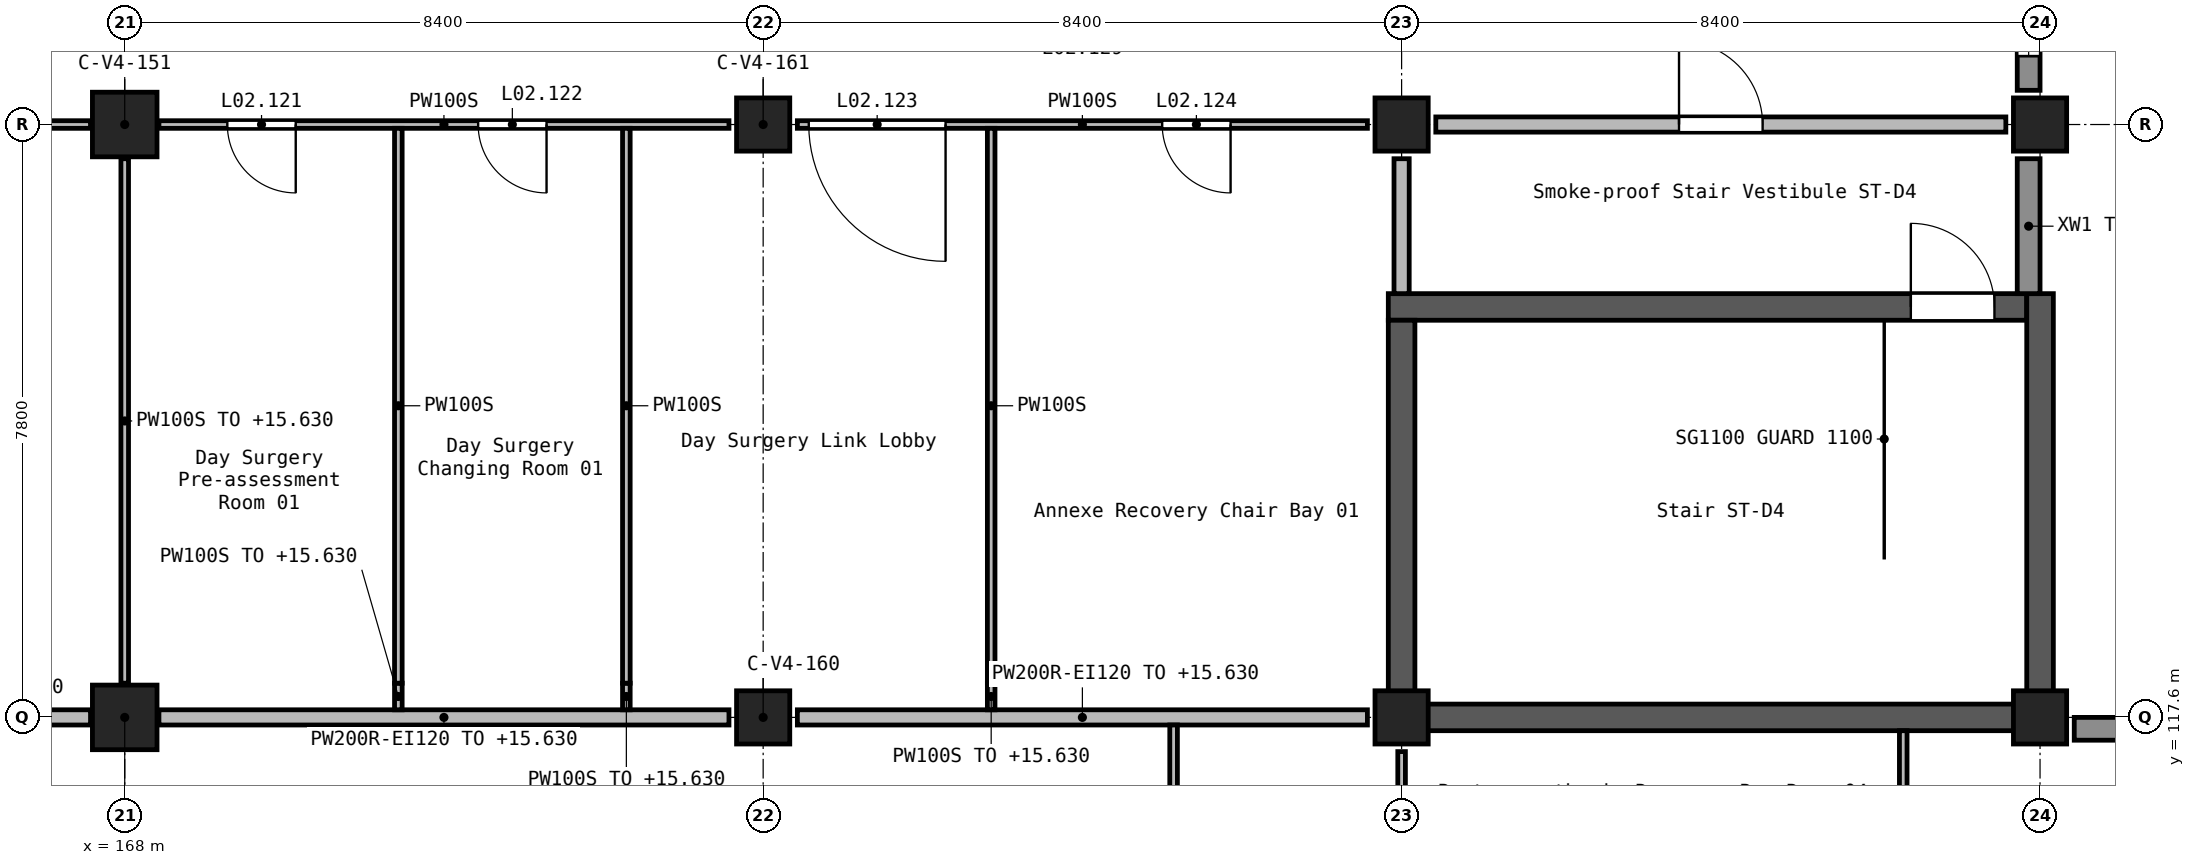
"""IFC4 building model, lengths in metres.
Left out: names, types, materials, properties, quantities, classifications, styles, units other than length and angle.
Written with IfcOpenShell. Run it as: python <this file> out.ifc"""

import sys

from ifc_helpers import new_model, si_unit, direction, frame, frame_2d, origin, origin_2d, place, context, subcontext, project, spatial, rectangle, extrude, element, fill, save


model = new_model("IFC4")
c1 = context("Model", 3, precision=1e-05, world=origin(), true_north=direction((0.0, 1.0)))
c2 = subcontext(c1, "Body", "Model", "MODEL_VIEW")
j1 = project(units=[si_unit("LENGTHUNIT", "METRE"), si_unit("PLANEANGLEUNIT", "RADIAN")], contexts=[c1])
p1 = place(None, origin())
s1 = spatial("IfcSite", under=j1, at=p1, CompositionType="ELEMENT")
p2 = place(p1, origin())
s2 = spatial("IfcBuilding", under=s1, at=p2, CompositionType="ELEMENT")
p3 = place(p2, frame((0.0, 0.0, 12.6)))
s3 = spatial("IfcBuildingStorey", under=s2, at=p3, CompositionType="ELEMENT", Elevation=12.6)
for number, where, z_axis, x_axis in (
    (1, (168.0, 117.6, 0.0), (0.0, 0.0, 1.0), (1.0, 0.0, 0.0)),
    (2, (168.0, 125.4, 0.0), (0.0, 0.0, 1.0), (1.0, 0.0, 0.0)),
):
    element("IfcColumn", number, at=place(p3, frame(where, z_axis=z_axis, x_axis=x_axis)), inside=s3, PredefinedType="COLUMN", context=c2, shape_type="SweptSolid", body=[
        extrude(rectangle(XDim=0.85, YDim=0.85, at=origin_2d()), origin(), (0.0, 0.0, 1.0), 4.2),
    ])
for number, where, z_axis, x_axis in (
    (3, (176.4, 117.6, 0.0), (0.0, 0.0, 1.0), (1.0, 0.0, 0.0)),
    (4, (176.4, 125.4, 0.0), (0.0, 0.0, 1.0), (1.0, 0.0, 0.0)),
    (5, (184.8, 117.6, 0.0), (0.0, 0.0, 1.0), (1.0, 0.0, 0.0)),
    (6, (184.8, 125.4, 0.0), (0.0, 0.0, 1.0), (1.0, 0.0, 0.0)),
    (7, (193.2, 117.6, 0.0), (0.0, 0.0, 1.0), (1.0, 0.0, 0.0)),
    (8, (193.2, 125.4, 0.0), (0.0, 0.0, 1.0), (1.0, 0.0, 0.0)),
):
    element("IfcColumn", number, at=place(p3, frame(where, z_axis=z_axis, x_axis=x_axis)), inside=s3, PredefinedType="COLUMN", context=c2, shape_type="SweptSolid", body=[
        extrude(rectangle(XDim=0.7, YDim=0.7, at=origin_2d()), origin(), (0.0, 0.0, 1.0), 4.2),
    ])
p4 = place(p3, frame((184.625, 123.0, 0.0), z_axis=(0.0, 0.0, 1.0), x_axis=(1.0, 0.0, 0.0)))
e9 = element("IfcWall", 9, at=p4, inside=s3, PredefinedType="SHEAR", context=c2, shape_type="SweptSolid", body=[
    extrude(rectangle(XDim=8.4, YDim=0.35, at=frame_2d((4.2, 0.0))), origin(), (0.0, 0.0, 1.0), 4.2),
])
p5 = place(p4, frame((6.875, 0.0, 0.0)))
e10 = element("IfcOpeningElement", 10, at=p5, cuts=e9, PredefinedType="OPENING", context=c2, shape_type="SweptSolid", body=[
    extrude(rectangle(XDim=1.1, YDim=2.1, at=frame_2d((0.55, 1.05))), frame((0.0, 0.185, 0.0), z_axis=(0.0, -1.0, 0.0), x_axis=(1.0, 0.0, 0.0)), (0.0, 0.0, 1.0), 0.37),
])
p6 = place(p3, frame((184.8, 117.425, 0.0), z_axis=(0.0, 0.0, 1.0), x_axis=(0.0, 1.0, 0.0)))
e11 = element("IfcWall", 11, at=p6, inside=s3, PredefinedType="SHEAR", context=c2, shape_type="SweptSolid", body=[
    extrude(rectangle(XDim=5.4, YDim=0.35, at=frame_2d((2.7, 0.0))), origin(), (0.0, 0.0, 1.0), 4.2),
])
p7 = place(p3, frame((184.975, 117.6, 0.0), z_axis=(0.0, 0.0, 1.0), x_axis=(1.0, 0.0, 0.0)))
e12 = element("IfcWall", 12, at=p7, inside=s3, PredefinedType="SHEAR", context=c2, shape_type="SweptSolid", body=[
    extrude(rectangle(XDim=8.05, YDim=0.35, at=frame_2d((4.025, 0.0))), origin(), (0.0, 0.0, 1.0), 4.2),
])
p8 = place(p3, frame((193.2, 117.425, 0.0), z_axis=(0.0, 0.0, 1.0), x_axis=(0.0, 1.0, 0.0)))
e13 = element("IfcWall", 13, at=p8, inside=s3, PredefinedType="SHEAR", context=c2, shape_type="SweptSolid", body=[
    extrude(rectangle(XDim=5.75, YDim=0.35, at=frame_2d((2.875, 0.0))), origin(), (0.0, 0.0, 1.0), 4.2),
])
p9 = place(p3, frame((197.0, 117.45, 0.0), z_axis=(0.0, 0.0, 1.0), x_axis=(-1.0, 0.0, 0.0)))
e14 = element("IfcWall", 14, at=p9, inside=s3, PredefinedType="STANDARD", context=c2, shape_type="SweptSolid", body=[
    extrude(rectangle(XDim=3.35, YDim=0.3, at=frame_2d((1.675, 0.0))), origin(), (0.0, 0.0, 1.0), 3.05),
])
p10 = place(p9, frame((1.075, 0.0, 1.2)))
e15 = element("IfcOpeningElement", 15, at=p10, cuts=e14, PredefinedType="OPENING", context=c2, shape_type="SweptSolid", body=[
    extrude(rectangle(XDim=1.2, YDim=1.2, at=frame_2d((0.6, 0.6))), frame((0.0, 0.16, 0.0), z_axis=(0.0, -1.0, 0.0), x_axis=(1.0, 0.0, 0.0)), (0.0, 0.0, 1.0), 0.32),
])
p11 = place(p3, frame((193.05, 123.175, 0.0), z_axis=(0.0, 0.0, 1.0), x_axis=(0.0, 1.0, 0.0)))
e16 = element("IfcWall", 16, at=p11, inside=s3, PredefinedType="STANDARD", context=c2, shape_type="SweptSolid", body=[
    extrude(rectangle(XDim=1.775, YDim=0.3, at=frame_2d((0.887, 0.0))), origin(), (0.0, 0.0, 1.0), 3.05),
])
p12 = place(p3, frame((193.05, 125.85, 0.0), z_axis=(0.0, 0.0, 1.0), x_axis=(0.0, 1.0, 0.0)))
e17 = element("IfcWall", 17, at=p12, inside=s3, PredefinedType="STANDARD", context=c2, shape_type="SweptSolid", body=[
    extrude(rectangle(XDim=2.7, YDim=0.3, at=frame_2d((1.35, 0.0))), origin(), (0.0, 0.0, 1.0), 3.05),
])
p13 = place(p12, frame((0.45, 0.0, 0.9)))
e18 = element("IfcOpeningElement", 18, at=p13, cuts=e17, PredefinedType="OPENING", context=c2, shape_type="SweptSolid", body=[
    extrude(rectangle(XDim=1.8, YDim=1.5, at=frame_2d((0.9, 0.75))), frame((0.0, 0.16, 0.0), z_axis=(0.0, -1.0, 0.0), x_axis=(1.0, 0.0, 0.0)), (0.0, 0.0, 1.0), 0.32),
])
for number, where, z_axis, x_axis in (
    (19, (184.35, 117.6, 0.0), (0.0, 0.0, 1.0), (-1.0, 0.0, 0.0)),
    (20, (175.95, 117.6, 0.0), (0.0, 0.0, 1.0), (-1.0, 0.0, 0.0)),
):
    element("IfcWall", number, at=place(p3, frame(where, z_axis=z_axis, x_axis=x_axis)), inside=s3, PredefinedType="SOLIDWALL", context=c2, shape_type="SweptSolid", body=[
        extrude(rectangle(XDim=7.5, YDim=0.2, at=frame_2d((3.75, 0.0))), origin(), (0.0, 0.0, 1.0), 3.03),
    ])
p14 = place(p3, frame((167.55, 117.6, 0.0), z_axis=(0.0, 0.0, 1.0), x_axis=(-1.0, 0.0, 0.0)))
e21 = element("IfcWall", 21, at=p14, inside=s3, PredefinedType="SOLIDWALL", context=c2, shape_type="SweptSolid", body=[
    extrude(rectangle(XDim=3.45, YDim=0.2, at=frame_2d((1.725, 0.0))), origin(), (0.0, 0.0, 1.0), 3.08),
])
p15 = place(p3, frame((185.25, 125.4, 0.0), z_axis=(0.0, 0.0, 1.0), x_axis=(1.0, 0.0, 0.0)))
e22 = element("IfcWall", 22, at=p15, inside=s3, PredefinedType="SOLIDWALL", context=c2, shape_type="SweptSolid", body=[
    extrude(rectangle(XDim=7.5, YDim=0.2, at=frame_2d((3.75, 0.0))), origin(), (0.0, 0.0, 1.0), 3.85),
])
p16 = place(p15, frame((3.2, 0.0, 0.0)))
e23 = element("IfcOpeningElement", 23, at=p16, cuts=e22, PredefinedType="OPENING", context=c2, shape_type="SweptSolid", body=[
    extrude(rectangle(XDim=1.1, YDim=2.1, at=frame_2d((0.55, 1.05))), frame((0.0, 0.11, 0.0), z_axis=(0.0, -1.0, 0.0), x_axis=(1.0, 0.0, 0.0)), (0.0, 0.0, 1.0), 0.22),
])
p17 = place(p3, frame((184.8, 123.175, 0.0), z_axis=(0.0, 0.0, 1.0), x_axis=(0.0, 1.0, 0.0)))
e24 = element("IfcWall", 24, at=p17, inside=s3, PredefinedType="SOLIDWALL", context=c2, shape_type="SweptSolid", body=[
    extrude(rectangle(XDim=1.775, YDim=0.2, at=frame_2d((0.887, 0.0))), origin(), (0.0, 0.0, 1.0), 3.85),
])
p18 = place(p3, frame((184.35, 125.4, 0.0), z_axis=(0.0, 0.0, 1.0), x_axis=(-1.0, 0.0, 0.0)))
e25 = element("IfcWall", 25, at=p18, inside=s3, PredefinedType="PARTITIONING", context=c2, shape_type="SweptSolid", body=[
    extrude(rectangle(XDim=7.5, YDim=0.1, at=frame_2d((3.75, 0.0))), origin(), (0.0, 0.0, 1.0), 3.85),
])
p19 = place(p18, frame((5.55, 0.0, 0.0)))
e26 = element("IfcOpeningElement", 26, at=p19, cuts=e25, PredefinedType="OPENING", context=c2, shape_type="SweptSolid", body=[
    extrude(rectangle(XDim=1.8, YDim=2.1, at=frame_2d((0.9, 1.05))), frame((0.0, 0.06, 0.0), z_axis=(0.0, -1.0, 0.0), x_axis=(1.0, 0.0, 0.0)), (0.0, 0.0, 1.0), 0.12),
])
p20 = place(p18, frame((1.8, 0.0, 0.0)))
e27 = element("IfcOpeningElement", 27, at=p20, cuts=e25, PredefinedType="OPENING", context=c2, shape_type="SweptSolid", body=[
    extrude(rectangle(XDim=0.9, YDim=2.1, at=frame_2d((0.45, 1.05))), frame((0.0, 0.06, 0.0), z_axis=(0.0, -1.0, 0.0), x_axis=(1.0, 0.0, 0.0)), (0.0, 0.0, 1.0), 0.12),
])
p21 = place(p3, frame((175.95, 125.4, 0.0), z_axis=(0.0, 0.0, 1.0), x_axis=(-1.0, 0.0, 0.0)))
e28 = element("IfcWall", 28, at=p21, inside=s3, PredefinedType="PARTITIONING", context=c2, shape_type="SweptSolid", body=[
    extrude(rectangle(XDim=7.5, YDim=0.1, at=frame_2d((3.75, 0.0))), origin(), (0.0, 0.0, 1.0), 3.85),
])
p22 = place(p21, frame((5.7, 0.0, 0.0)))
e29 = element("IfcOpeningElement", 29, at=p22, cuts=e28, PredefinedType="OPENING", context=c2, shape_type="SweptSolid", body=[
    extrude(rectangle(XDim=0.9, YDim=2.1, at=frame_2d((0.45, 1.05))), frame((0.0, 0.06, 0.0), z_axis=(0.0, -1.0, 0.0), x_axis=(1.0, 0.0, 0.0)), (0.0, 0.0, 1.0), 0.12),
])
p23 = place(p21, frame((2.4, 0.0, 0.0)))
e30 = element("IfcOpeningElement", 30, at=p23, cuts=e28, PredefinedType="OPENING", context=c2, shape_type="SweptSolid", body=[
    extrude(rectangle(XDim=0.9, YDim=2.1, at=frame_2d((0.45, 1.05))), frame((0.0, 0.06, 0.0), z_axis=(0.0, -1.0, 0.0), x_axis=(1.0, 0.0, 0.0)), (0.0, 0.0, 1.0), 0.12),
])
p24 = place(p3, frame((167.55, 125.4, 0.0), z_axis=(0.0, 0.0, 1.0), x_axis=(-1.0, 0.0, 0.0)))
e31 = element("IfcWall", 31, at=p24, inside=s3, PredefinedType="PARTITIONING", context=c2, shape_type="SweptSolid", body=[
    extrude(rectangle(XDim=7.5, YDim=0.1, at=frame_2d((3.75, 0.0))), origin(), (0.0, 0.0, 1.0), 3.85),
])
p25 = place(p24, frame((2.85, 0.0, 0.0)))
e32 = element("IfcOpeningElement", 32, at=p25, cuts=e31, PredefinedType="OPENING", context=c2, shape_type="SweptSolid", body=[
    extrude(rectangle(XDim=1.8, YDim=2.1, at=frame_2d((0.9, 1.05))), frame((0.0, 0.06, 0.0), z_axis=(0.0, -1.0, 0.0), x_axis=(1.0, 0.0, 0.0)), (0.0, 0.0, 1.0), 0.12),
])
p26 = place(p3, frame((181.8, 117.5, 0.0), z_axis=(0.0, 0.0, 1.0), x_axis=(0.0, -1.0, 0.0)))
e33 = element("IfcWall", 33, at=p26, inside=s3, PredefinedType="PARTITIONING", context=c2, shape_type="SweptSolid", body=[
    extrude(rectangle(XDim=18.55, YDim=0.1, at=frame_2d((9.275, 0.0))), origin(), (0.0, 0.0, 1.0), 3.85),
])
p27 = place(p26, frame((9.05, 0.0, 0.0)))
e34 = element("IfcOpeningElement", 34, at=p27, cuts=e33, PredefinedType="OPENING", context=c2, shape_type="SweptSolid", body=[
    extrude(rectangle(XDim=0.9, YDim=2.1, at=frame_2d((0.45, 1.05))), frame((0.0, 0.06, 0.0), z_axis=(0.0, -1.0, 0.0), x_axis=(1.0, 0.0, 0.0)), (0.0, 0.0, 1.0), 0.12),
])
p28 = place(p26, frame((6.051, 0.0, 0.0)))
e35 = element("IfcOpeningElement", 35, at=p28, cuts=e33, PredefinedType="OPENING", context=c2, shape_type="SweptSolid", body=[
    extrude(rectangle(XDim=0.9, YDim=2.1, at=frame_2d((0.45, 1.05))), frame((0.0, 0.06, 0.0), z_axis=(0.0, -1.0, 0.0), x_axis=(1.0, 0.0, 0.0)), (0.0, 0.0, 1.0), 0.12),
])
p29 = place(p26, frame((1.851, 0.0, 0.0)))
e36 = element("IfcOpeningElement", 36, at=p29, cuts=e33, PredefinedType="OPENING", context=c2, shape_type="SweptSolid", body=[
    extrude(rectangle(XDim=0.9, YDim=2.1, at=frame_2d((0.45, 1.05))), frame((0.0, 0.06, 0.0), z_axis=(0.0, -1.0, 0.0), x_axis=(1.0, 0.0, 0.0)), (0.0, 0.0, 1.0), 0.12),
])
p30 = place(p3, frame((184.8, 117.15, 0.0), z_axis=(0.0, 0.0, 1.0), x_axis=(0.0, -1.0, 0.0)))
e37 = element("IfcWall", 37, at=p30, inside=s3, PredefinedType="PARTITIONING", context=c2, shape_type="SweptSolid", body=[
    extrude(rectangle(XDim=18.2, YDim=0.1, at=frame_2d((9.1, 0.0))), origin(), (0.0, 0.0, 1.0), 3.85),
])
p31 = place(p30, frame((13.55, 0.0, 0.0)))
e38 = element("IfcOpeningElement", 38, at=p31, cuts=e37, PredefinedType="OPENING", context=c2, shape_type="SweptSolid", body=[
    extrude(rectangle(XDim=1.4, YDim=2.1, at=frame_2d((0.7, 1.05))), frame((0.0, 0.06, 0.0), z_axis=(0.0, -1.0, 0.0), x_axis=(1.0, 0.0, 0.0)), (0.0, 0.0, 1.0), 0.12),
])
p32 = place(p30, frame((9.35, 0.0, 0.0)))
e39 = element("IfcOpeningElement", 39, at=p32, cuts=e37, PredefinedType="OPENING", context=c2, shape_type="SweptSolid", body=[
    extrude(rectangle(XDim=1.4, YDim=2.1, at=frame_2d((0.7, 1.05))), frame((0.0, 0.06, 0.0), z_axis=(0.0, -1.0, 0.0), x_axis=(1.0, 0.0, 0.0)), (0.0, 0.0, 1.0), 0.12),
])
p33 = place(p30, frame((5.4, 0.0, 0.0)))
e40 = element("IfcOpeningElement", 40, at=p33, cuts=e37, PredefinedType="OPENING", context=c2, shape_type="SweptSolid", body=[
    extrude(rectangle(XDim=0.9, YDim=2.1, at=frame_2d((0.45, 1.05))), frame((0.0, 0.06, 0.0), z_axis=(0.0, -1.0, 0.0), x_axis=(1.0, 0.0, 0.0)), (0.0, 0.0, 1.0), 0.12),
])
p34 = place(p30, frame((0.95, 0.0, 0.0)))
e41 = element("IfcOpeningElement", 41, at=p34, cuts=e37, PredefinedType="OPENING", context=c2, shape_type="SweptSolid", body=[
    extrude(rectangle(XDim=1.4, YDim=2.1, at=frame_2d((0.7, 1.05))), frame((0.0, 0.06, 0.0), z_axis=(0.0, -1.0, 0.0), x_axis=(1.0, 0.0, 0.0)), (0.0, 0.0, 1.0), 0.12),
])
p35 = place(p3, frame((191.4, 117.425, 0.0), z_axis=(0.0, 0.0, 1.0), x_axis=(0.0, -1.0, 0.0)))
e42 = element("IfcWall", 42, at=p35, inside=s3, PredefinedType="PARTITIONING", context=c2, shape_type="SweptSolid", body=[
    extrude(rectangle(XDim=18.475, YDim=0.1, at=frame_2d((9.238, 0.0))), origin(), (0.0, 0.0, 1.0), 3.85),
])
p36 = place(p3, frame((168.0, 118.05, 0.0), z_axis=(0.0, 0.0, 1.0), x_axis=(0.0, 1.0, 0.0)))
e43 = element("IfcWall", 43, at=p36, inside=s3, PredefinedType="PARTITIONING", context=c2, shape_type="SweptSolid", body=[
    extrude(rectangle(XDim=6.9, YDim=0.1, at=frame_2d((3.45, 0.0))), origin(), (0.0, 0.0, 1.0), 3.03),
])
p37 = place(p3, frame((171.6, 117.7, 0.0), z_axis=(0.0, 0.0, 1.0), x_axis=(0.0, 1.0, 0.0)))
e44 = element("IfcWall", 44, at=p37, inside=s3, PredefinedType="PARTITIONING", context=c2, shape_type="SweptSolid", body=[
    extrude(rectangle(XDim=0.35, YDim=0.1, at=frame_2d((0.175, 0.0))), origin(), (0.0, 0.0, 1.0), 3.03),
])
p38 = place(p3, frame((171.6, 118.05, 0.0), z_axis=(0.0, 0.0, 1.0), x_axis=(0.0, 1.0, 0.0)))
e45 = element("IfcWall", 45, at=p38, inside=s3, PredefinedType="PARTITIONING", context=c2, shape_type="SweptSolid", body=[
    extrude(rectangle(XDim=7.3, YDim=0.1, at=frame_2d((3.65, 0.0))), origin(), (0.0, 0.0, 1.0), 3.85),
])
p39 = place(p3, frame((174.6, 117.7, 0.0), z_axis=(0.0, 0.0, 1.0), x_axis=(0.0, 1.0, 0.0)))
e46 = element("IfcWall", 46, at=p39, inside=s3, PredefinedType="PARTITIONING", context=c2, shape_type="SweptSolid", body=[
    extrude(rectangle(XDim=0.35, YDim=0.1, at=frame_2d((0.175, 0.0))), origin(), (0.0, 0.0, 1.0), 3.03),
])
p40 = place(p3, frame((174.6, 118.05, 0.0), z_axis=(0.0, 0.0, 1.0), x_axis=(0.0, 1.0, 0.0)))
e47 = element("IfcWall", 47, at=p40, inside=s3, PredefinedType="PARTITIONING", context=c2, shape_type="SweptSolid", body=[
    extrude(rectangle(XDim=7.3, YDim=0.1, at=frame_2d((3.65, 0.0))), origin(), (0.0, 0.0, 1.0), 3.85),
])
p41 = place(p3, frame((179.4, 117.7, 0.0), z_axis=(0.0, 0.0, 1.0), x_axis=(0.0, 1.0, 0.0)))
e48 = element("IfcWall", 48, at=p41, inside=s3, PredefinedType="PARTITIONING", context=c2, shape_type="SweptSolid", body=[
    extrude(rectangle(XDim=0.35, YDim=0.1, at=frame_2d((0.175, 0.0))), origin(), (0.0, 0.0, 1.0), 3.03),
])
p42 = place(p3, frame((179.4, 118.05, 0.0), z_axis=(0.0, 0.0, 1.0), x_axis=(0.0, 1.0, 0.0)))
e49 = element("IfcWall", 49, at=p42, inside=s3, PredefinedType="PARTITIONING", context=c2, shape_type="SweptSolid", body=[
    extrude(rectangle(XDim=7.3, YDim=0.1, at=frame_2d((3.65, 0.0))), origin(), (0.0, 0.0, 1.0), 3.85),
])
p43 = place(p13, origin())
e50 = element("IfcWindow", 50, at=p43, inside=s3, PartitioningType="SINGLE_PANEL", PredefinedType="WINDOW", context=c2, shape_type="SweptSolid", body=[
    extrude(rectangle(XDim=1.8, YDim=1.5, at=frame_2d((0.9, 0.75))), frame((0.0, 0.03, 0.0), z_axis=(0.0, -1.0, 0.0), x_axis=(1.0, 0.0, 0.0)), (0.0, 0.0, 1.0), 0.06),
])
fill(e18, e50)
p44 = place(p5, frame((1.1, 0.0, 0.0), z_axis=(0.0, 0.0, 1.0), x_axis=(-1.0, 0.0, 0.0)))
e51 = element("IfcDoor", 51, at=p44, inside=s3, OperationType="SINGLE_SWING_LEFT", PredefinedType="DOOR", context=c2, shape_type="SweptSolid", body=[
    extrude(rectangle(XDim=1.1, YDim=2.1, at=frame_2d((0.55, 1.05))), frame((0.0, 0.025, 0.0), z_axis=(0.0, -1.0, 0.0), x_axis=(1.0, 0.0, 0.0)), (0.0, 0.0, 1.0), 0.05),
])
fill(e10, e51)
p45 = place(p16, frame((1.1, 0.0, 0.0), z_axis=(0.0, 0.0, 1.0), x_axis=(-1.0, 0.0, 0.0)))
e52 = element("IfcDoor", 52, at=p45, inside=s3, OperationType="SINGLE_SWING_LEFT", PredefinedType="DOOR", context=c2, shape_type="SweptSolid", body=[
    extrude(rectangle(XDim=1.1, YDim=2.1, at=frame_2d((0.55, 1.05))), frame((0.0, 0.025, 0.0), z_axis=(0.0, -1.0, 0.0), x_axis=(1.0, 0.0, 0.0)), (0.0, 0.0, 1.0), 0.05),
])
fill(e23, e52)
p46 = place(p22, origin())
e53 = element("IfcDoor", 53, at=p46, inside=s3, OperationType="SINGLE_SWING_RIGHT", PredefinedType="DOOR", context=c2, shape_type="SweptSolid", body=[
    extrude(rectangle(XDim=0.9, YDim=2.1, at=frame_2d((0.45, 1.05))), frame((0.0, 0.025, 0.0), z_axis=(0.0, -1.0, 0.0), x_axis=(1.0, 0.0, 0.0)), (0.0, 0.0, 1.0), 0.05),
])
fill(e29, e53)
p47 = place(p23, origin())
e54 = element("IfcDoor", 54, at=p47, inside=s3, OperationType="SINGLE_SWING_LEFT", PredefinedType="DOOR", context=c2, shape_type="SweptSolid", body=[
    extrude(rectangle(XDim=0.9, YDim=2.1, at=frame_2d((0.45, 1.05))), frame((0.0, 0.025, 0.0), z_axis=(0.0, -1.0, 0.0), x_axis=(1.0, 0.0, 0.0)), (0.0, 0.0, 1.0), 0.05),
])
fill(e30, e54)
p48 = place(p19, origin())
e55 = element("IfcDoor", 55, at=p48, inside=s3, OperationType="DOUBLE_DOOR_SINGLE_SWING", PredefinedType="DOOR", context=c2, shape_type="SweptSolid", body=[
    extrude(rectangle(XDim=1.8, YDim=2.1, at=frame_2d((0.9, 1.05))), frame((0.0, 0.025, 0.0), z_axis=(0.0, -1.0, 0.0), x_axis=(1.0, 0.0, 0.0)), (0.0, 0.0, 1.0), 0.05),
])
fill(e26, e55)
p49 = place(p20, origin())
e56 = element("IfcDoor", 56, at=p49, inside=s3, OperationType="SINGLE_SWING_LEFT", PredefinedType="DOOR", context=c2, shape_type="SweptSolid", body=[
    extrude(rectangle(XDim=0.9, YDim=2.1, at=frame_2d((0.45, 1.05))), frame((0.0, 0.025, 0.0), z_axis=(0.0, -1.0, 0.0), x_axis=(1.0, 0.0, 0.0)), (0.0, 0.0, 1.0), 0.05),
])
fill(e27, e56)
save(model, sys.argv[1])
